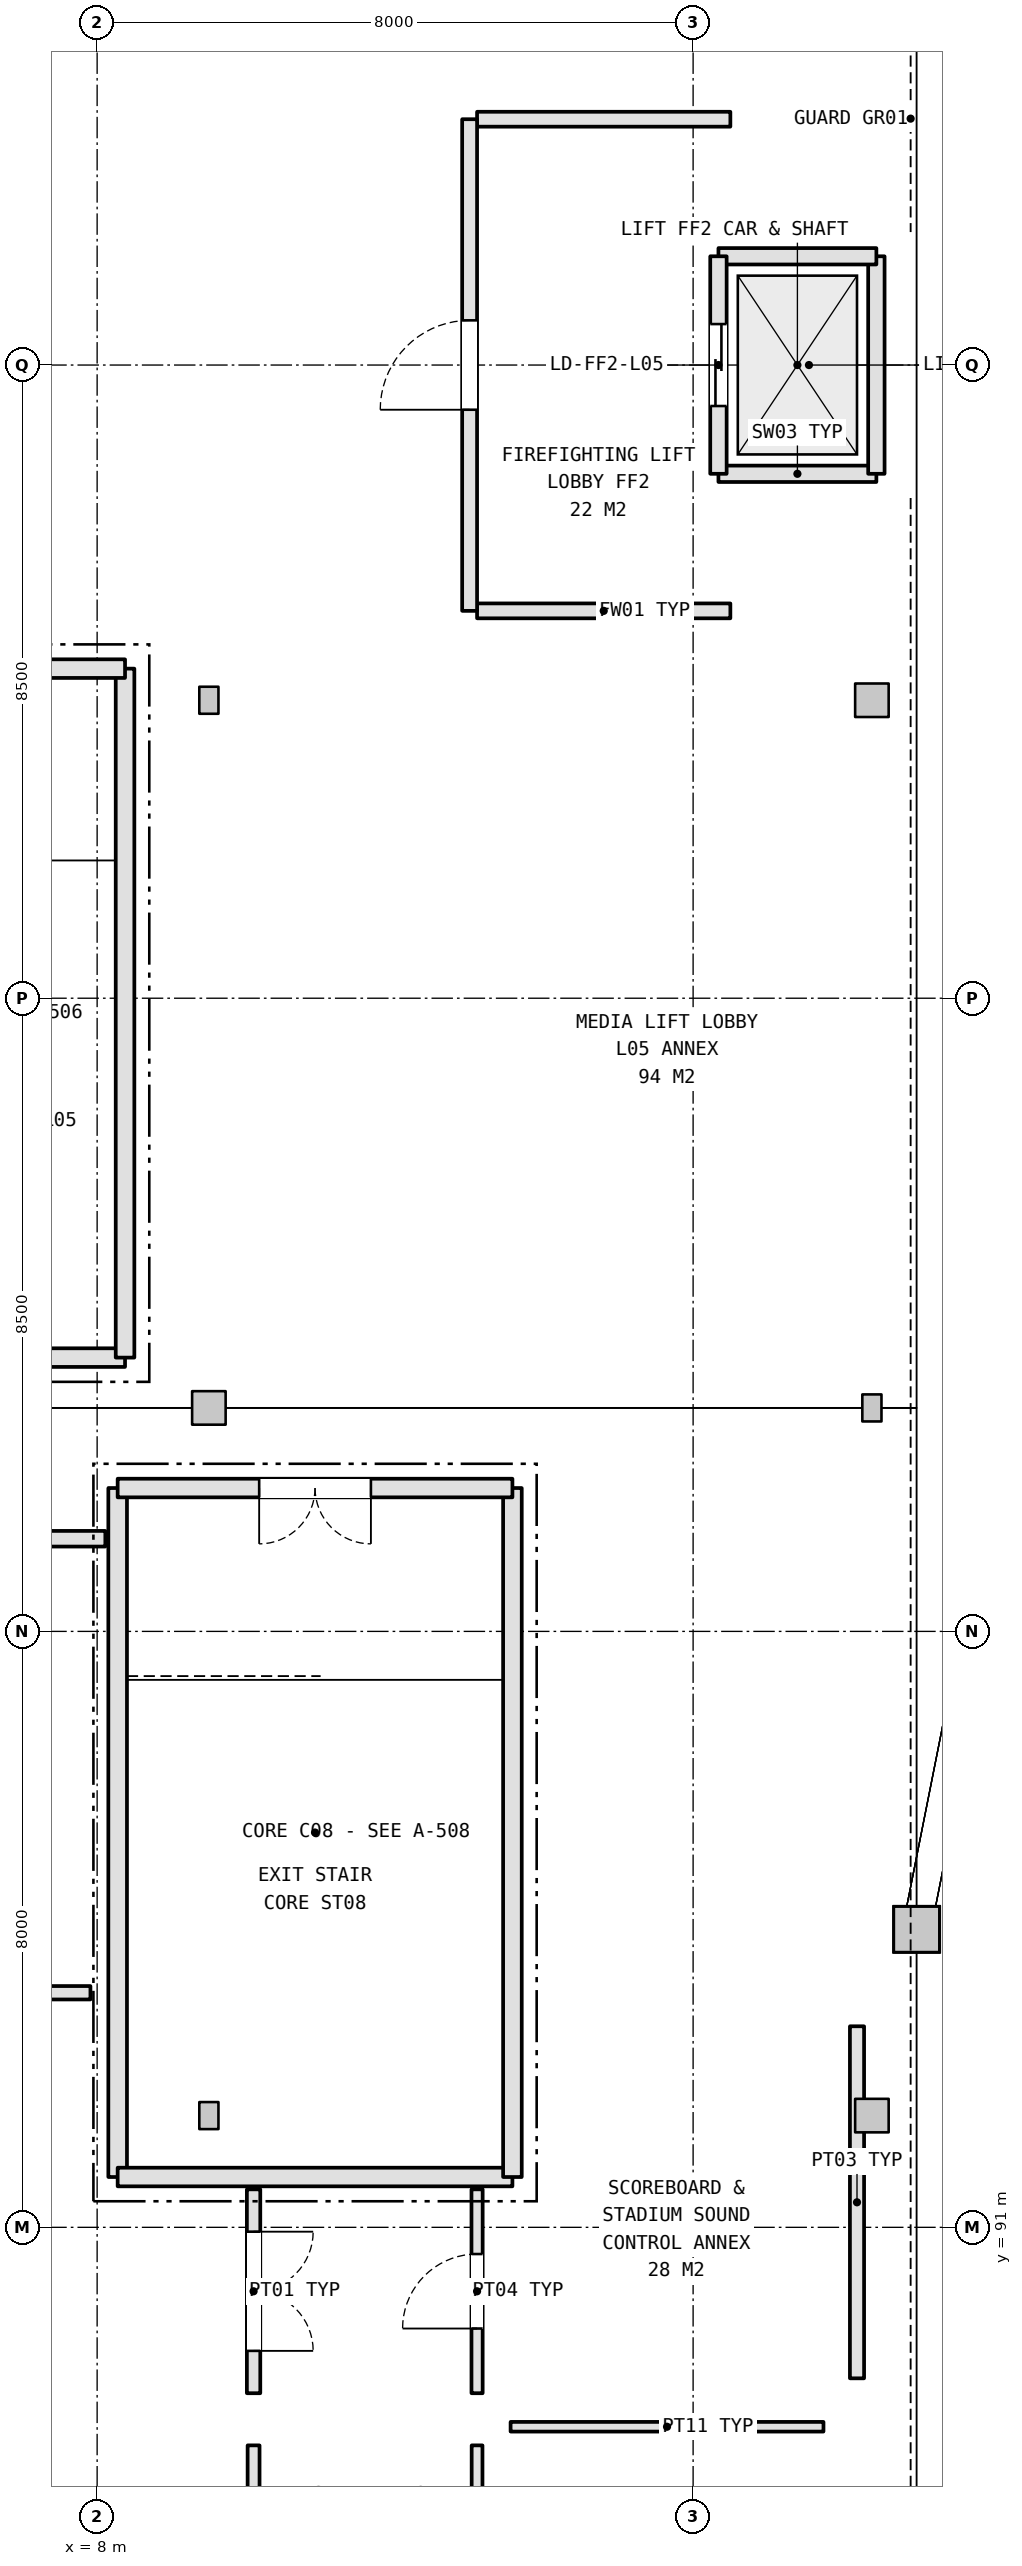
"""IFC4 building model, lengths in metres.
Left out: names, types, materials, properties, quantities, classifications, styles, units other than length and angle.
Written with IfcOpenShell. Run it as: python <this file> out.ifc"""

import sys

from ifc_helpers import new_model, si_unit, direction, frame, frame_2d, origin, origin_2d, place, context, subcontext, project, spatial, rectangle, hollow_circle, i_section, extrude, element, fill, save


model = new_model("IFC4")
c1 = context("Model", 3, precision=1e-05, world=origin(), true_north=direction((0.0, 1.0)))
c2 = subcontext(c1, "Body", "Model", "MODEL_VIEW")
j1 = project(units=[si_unit("LENGTHUNIT", "METRE"), si_unit("PLANEANGLEUNIT", "RADIAN")], contexts=[c1])
p1 = place(None, origin())
s1 = spatial("IfcSite", under=j1, at=p1, CompositionType="ELEMENT")
p2 = place(p1, origin())
s2 = spatial("IfcBuilding", under=s1, at=p2, CompositionType="ELEMENT")
p3 = place(p2, frame((0.0, 0.0, 27.0)))
s3 = spatial("IfcBuildingStorey", under=s2, at=p3, CompositionType="ELEMENT", Elevation=27.0)
p4 = place(p3, frame((19.0, 95.0, 0.0), z_axis=(0.0, 0.0, 1.0), x_axis=(1.0, 0.0, 0.0)))
e1 = element("IfcColumn", 1, at=p4, inside=s3, PredefinedType="PILASTER", context=c2, shape_type="SweptSolid", body=[
    extrude(hollow_circle(Radius=0.305, WallThickness=0.025, at=origin_2d()), origin(), (0.0, 0.0, 1.0), 4.8),
])
p5 = place(p3, frame((9.5, 92.5, 0.0), z_axis=(0.0, 0.0, 1.0), x_axis=(1.0, 0.0, 0.0)))
e2 = element("IfcColumn", 2, at=p5, inside=s3, PredefinedType="COLUMN", context=c2, shape_type="SweptSolid", body=[
    extrude(i_section(OverallWidth=0.257, OverallDepth=0.363, WebThickness=0.013, FlangeThickness=0.022, FilletRadius=0.015, at=origin_2d()), origin(), (0.0, 0.0, 1.0), 5.428),
])
p6 = place(p3, frame((9.5, 102.0, 0.0), z_axis=(0.0, 0.0, 1.0), x_axis=(1.0, 0.0, 0.0)))
e3 = element("IfcColumn", 3, at=p6, inside=s3, PredefinedType="COLUMN", context=c2, shape_type="SweptSolid", body=[
    extrude(rectangle(XDim=0.45, YDim=0.45, at=origin_2d()), origin(), (0.0, 0.0, 1.0), 5.428),
])
p7 = place(p3, frame((9.5, 111.5, 0.0), z_axis=(0.0, 0.0, 1.0), x_axis=(1.0, 0.0, 0.0)))
e4 = element("IfcColumn", 4, at=p7, inside=s3, PredefinedType="COLUMN", context=c2, shape_type="SweptSolid", body=[
    extrude(i_section(OverallWidth=0.257, OverallDepth=0.363, WebThickness=0.013, FlangeThickness=0.022, FilletRadius=0.015, at=origin_2d()), origin(), (0.0, 0.0, 1.0), 5.428),
])
p8 = place(p3, frame((18.4, 92.5, 0.0), z_axis=(0.0, 0.0, 1.0), x_axis=(1.0, 0.0, 0.0)))
e5 = element("IfcColumn", 5, at=p8, inside=s3, PredefinedType="COLUMN", context=c2, shape_type="SweptSolid", body=[
    extrude(rectangle(XDim=0.45, YDim=0.45, at=origin_2d()), origin(), (0.0, 0.0, 1.0), 6.186),
])
p9 = place(p3, frame((18.4, 102.0, 0.0), z_axis=(0.0, 0.0, 1.0), x_axis=(1.0, 0.0, 0.0)))
e6 = element("IfcColumn", 6, at=p9, inside=s3, PredefinedType="COLUMN", context=c2, shape_type="SweptSolid", body=[
    extrude(i_section(OverallWidth=0.257, OverallDepth=0.363, WebThickness=0.013, FlangeThickness=0.022, FilletRadius=0.015, at=origin_2d()), origin(), (0.0, 0.0, 1.0), 6.186),
])
p10 = place(p3, frame((18.4, 111.5, 0.0), z_axis=(0.0, 0.0, 1.0), x_axis=(1.0, 0.0, 0.0)))
e7 = element("IfcColumn", 7, at=p10, inside=s3, PredefinedType="COLUMN", context=c2, shape_type="SweptSolid", body=[
    extrude(rectangle(XDim=0.45, YDim=0.45, at=origin_2d()), origin(), (0.0, 0.0, 1.0), 6.186),
])
p11 = place(p3, frame((3.075, 102.675, 0.0), z_axis=(0.0, 0.0, 1.0), x_axis=(1.0, 0.0, 0.0)))
e8 = element("IfcWall", 8, at=p11, inside=s3, PredefinedType="SHEAR", context=c2, shape_type="SweptSolid", body=[
    extrude(rectangle(XDim=5.299, YDim=0.25, at=frame_2d((2.649, 0.0))), origin(), (0.0, 0.0, 1.0), 4.62),
])
p12 = place(p3, frame((8.375, 102.675, 0.0), z_axis=(0.0, 0.0, 1.0), x_axis=(0.0, 1.0, 0.0)))
e9 = element("IfcWall", 9, at=p12, inside=s3, PredefinedType="SHEAR", context=c2, shape_type="SweptSolid", body=[
    extrude(rectangle(XDim=9.249, YDim=0.25, at=frame_2d((4.625, 0.0))), origin(), (0.0, 0.0, 1.0), 4.62),
])
p13 = place(p3, frame((8.375, 111.925, 0.0), z_axis=(0.0, 0.0, 1.0), x_axis=(-1.0, 0.0, 0.0)))
e10 = element("IfcWall", 10, at=p13, inside=s3, PredefinedType="SHEAR", context=c2, shape_type="SweptSolid", body=[
    extrude(rectangle(XDim=5.299, YDim=0.25, at=frame_2d((2.649, 0.0))), origin(), (0.0, 0.0, 1.0), 4.62),
])
p14 = place(p13, frame((1.9, 0.0, 0.0)))
e11 = element("IfcOpeningElement", 11, at=p14, cuts=e10, PredefinedType="OPENING", context=c2, shape_type="SweptSolid", body=[
    extrude(rectangle(XDim=1.5, YDim=2.2, at=frame_2d((0.75, 1.1))), frame((0.0, 0.135, 0.0), z_axis=(0.0, -1.0, 0.0), x_axis=(1.0, 0.0, 0.0)), (0.0, 0.0, 1.0), 0.27),
])
p15 = place(p3, frame((8.275, 100.925, 0.0), z_axis=(0.0, 0.0, 1.0), x_axis=(0.0, -1.0, 0.0)))
e12 = element("IfcWall", 12, at=p15, inside=s3, PredefinedType="SHEAR", context=c2, shape_type="SweptSolid", body=[
    extrude(rectangle(XDim=9.249, YDim=0.25, at=frame_2d((4.625, 0.0))), origin(), (0.0, 0.0, 1.0), 4.62),
])
p16 = place(p3, frame((8.275, 91.675, 0.0), z_axis=(0.0, 0.0, 1.0), x_axis=(1.0, 0.0, 0.0)))
e13 = element("IfcWall", 13, at=p16, inside=s3, PredefinedType="SHEAR", context=c2, shape_type="SweptSolid", body=[
    extrude(rectangle(XDim=5.299, YDim=0.25, at=frame_2d((2.65, 0.0))), origin(), (0.0, 0.0, 1.0), 4.62),
])
p17 = place(p3, frame((13.575, 91.675, 0.0), z_axis=(0.0, 0.0, 1.0), x_axis=(0.0, 1.0, 0.0)))
e14 = element("IfcWall", 14, at=p17, inside=s3, PredefinedType="SHEAR", context=c2, shape_type="SweptSolid", body=[
    extrude(rectangle(XDim=9.249, YDim=0.25, at=frame_2d((4.625, 0.0))), origin(), (0.0, 0.0, 1.0), 4.62),
])
p18 = place(p3, frame((13.575, 100.925, 0.0), z_axis=(0.0, 0.0, 1.0), x_axis=(-1.0, 0.0, 0.0)))
e15 = element("IfcWall", 15, at=p18, inside=s3, PredefinedType="SHEAR", context=c2, shape_type="SweptSolid", body=[
    extrude(rectangle(XDim=5.299, YDim=0.25, at=frame_2d((2.65, 0.0))), origin(), (0.0, 0.0, 1.0), 4.62),
])
p19 = place(p18, frame((1.9, 0.0, 0.0)))
e16 = element("IfcOpeningElement", 16, at=p19, cuts=e15, PredefinedType="OPENING", context=c2, shape_type="SweptSolid", body=[
    extrude(rectangle(XDim=1.5, YDim=2.2, at=frame_2d((0.75, 1.1))), frame((0.0, 0.135, 0.0), z_axis=(0.0, -1.0, 0.0), x_axis=(1.0, 0.0, 0.0)), (0.0, 0.0, 1.0), 0.27),
])
p20 = place(p3, frame((16.34, 114.54, 0.0), z_axis=(0.0, 0.0, 1.0), x_axis=(1.0, 0.0, 0.0)))
e17 = element("IfcWall", 17, at=p20, inside=s3, PredefinedType="SHEAR", context=c2, shape_type="SweptSolid", body=[
    extrude(rectangle(XDim=2.12, YDim=0.22, at=frame_2d((1.06, 0.0))), origin(), (0.0, 0.0, 1.0), 4.62),
])
p21 = place(p3, frame((18.46, 114.54, 0.0), z_axis=(0.0, 0.0, 1.0), x_axis=(0.0, 1.0, 0.0)))
e18 = element("IfcWall", 18, at=p21, inside=s3, PredefinedType="SHEAR", context=c2, shape_type="SweptSolid", body=[
    extrude(rectangle(XDim=2.92, YDim=0.22, at=frame_2d((1.46, 0.0))), origin(), (0.0, 0.0, 1.0), 4.62),
])
p22 = place(p3, frame((18.46, 117.46, 0.0), z_axis=(0.0, 0.0, 1.0), x_axis=(-1.0, 0.0, 0.0)))
e19 = element("IfcWall", 19, at=p22, inside=s3, PredefinedType="SHEAR", context=c2, shape_type="SweptSolid", body=[
    extrude(rectangle(XDim=2.12, YDim=0.22, at=frame_2d((1.06, 0.0))), origin(), (0.0, 0.0, 1.0), 4.62),
])
p23 = place(p3, frame((16.34, 117.46, 0.0), z_axis=(0.0, 0.0, 1.0), x_axis=(0.0, -1.0, 0.0)))
e20 = element("IfcWall", 20, at=p23, inside=s3, PredefinedType="SHEAR", context=c2, shape_type="SweptSolid", body=[
    extrude(rectangle(XDim=2.92, YDim=0.22, at=frame_2d((1.46, 0.0))), origin(), (0.0, 0.0, 1.0), 4.62),
])
p24 = place(p23, frame((0.91, 0.0, 0.0)))
e21 = element("IfcOpeningElement", 21, at=p24, cuts=e20, PredefinedType="OPENING", context=c2, shape_type="SweptSolid", body=[
    extrude(rectangle(XDim=1.1, YDim=2.2, at=frame_2d((0.55, 1.1))), frame((0.0, 0.12, 0.0), z_axis=(0.0, -1.0, 0.0), x_axis=(1.0, 0.0, 0.0)), (0.0, 0.0, 1.0), 0.24),
])
for number, where, z_axis, x_axis in (
    (22, (13.1, 112.7, 0.0), (0.0, 0.0, 1.0), (1.0, 0.0, 0.0)),
    (23, (16.5, 119.3, 0.0), (0.0, 0.0, 1.0), (-1.0, 0.0, 0.0)),
):
    element("IfcWall", number, at=place(p3, frame(where, z_axis=z_axis, x_axis=x_axis)), inside=s3, PredefinedType="SOLIDWALL", context=c2, shape_type="SweptSolid", body=[
        extrude(rectangle(XDim=3.4, YDim=0.2, at=frame_2d((1.7, 0.0))), origin(), (0.0, 0.0, 1.0), 3.3),
    ])
p25 = place(p3, frame((13.0, 119.3, 0.0), z_axis=(0.0, 0.0, 1.0), x_axis=(0.0, -1.0, 0.0)))
e24 = element("IfcWall", 24, at=p25, inside=s3, PredefinedType="SOLIDWALL", context=c2, shape_type="SweptSolid", body=[
    extrude(rectangle(XDim=6.6, YDim=0.2, at=frame_2d((3.3, 0.0))), origin(), (0.0, 0.0, 1.0), 3.3),
])
p26 = place(p25, frame((2.7, 0.0, 0.0)))
e25 = element("IfcOpeningElement", 25, at=p26, cuts=e24, PredefinedType="OPENING", context=c2, shape_type="SweptSolid", body=[
    extrude(rectangle(XDim=1.2, YDim=2.2, at=frame_2d((0.6, 1.1))), frame((0.0, 0.11, 0.0), z_axis=(0.0, -1.0, 0.0), x_axis=(1.0, 0.0, 0.0)), (0.0, 0.0, 1.0), 0.22),
])
p27 = place(p3, frame((10.1, 88.073, 0.0), z_axis=(0.0, 0.0, 1.0), x_axis=(0.0, -1.0, 0.0)))
e26 = element("IfcWall", 26, at=p27, inside=s3, PredefinedType="PARTITIONING", context=c2, shape_type="SweptSolid", body=[
    extrude(rectangle(XDim=6.47, YDim=0.16, at=frame_2d((3.235, 0.0))), origin(), (0.0, 0.0, 1.0), 3.5),
])
p28 = place(p27, frame((2.725, 0.0, 0.0)))
e27 = element("IfcOpeningElement", 27, at=p28, cuts=e26, PredefinedType="OPENING", context=c2, shape_type="SweptSolid", body=[
    extrude(rectangle(XDim=1.02, YDim=2.15, at=frame_2d((0.51, 1.075))), frame((0.0, 0.09, 0.0), z_axis=(0.0, -1.0, 0.0), x_axis=(1.0, 0.0, 0.0)), (0.0, 0.0, 1.0), 0.18),
])
p29 = place(p3, frame((13.1, 81.603, 0.0), z_axis=(0.0, 0.0, 1.0), x_axis=(0.0, 1.0, 0.0)))
e28 = element("IfcWall", 28, at=p29, inside=s3, PredefinedType="PARTITIONING", context=c2, shape_type="SweptSolid", body=[
    extrude(rectangle(XDim=6.47, YDim=0.145, at=frame_2d((3.235, 0.0))), origin(), (0.0, 0.0, 1.0), 3.5),
])
p30 = place(p29, frame((2.675, 0.0, 0.0)))
e29 = element("IfcOpeningElement", 29, at=p30, cuts=e28, PredefinedType="OPENING", context=c2, shape_type="SweptSolid", body=[
    extrude(rectangle(XDim=1.12, YDim=2.2, at=frame_2d((0.56, 1.1))), frame((0.0, 0.083, 0.0), z_axis=(0.0, -1.0, 0.0), x_axis=(1.0, 0.0, 0.0)), (0.0, 0.0, 1.0), 0.165),
])
p31 = place(p3, frame((13.55, 88.323, 0.0), z_axis=(0.0, 0.0, 1.0), x_axis=(1.0, 0.0, 0.0)))
e30 = element("IfcWall", 30, at=p31, inside=s3, PredefinedType="PARTITIONING", context=c2, shape_type="SweptSolid", body=[
    extrude(rectangle(XDim=4.2, YDim=0.13, at=frame_2d((2.1, 0.0))), origin(), (0.0, 0.0, 1.0), 3.5),
])
p32 = place(p3, frame((10.1, 91.51, 0.0), z_axis=(0.0, 0.0, 1.0), x_axis=(0.0, -1.0, 0.0)))
e31 = element("IfcWall", 31, at=p32, inside=s3, PredefinedType="PARTITIONING", context=c2, shape_type="SweptSolid", body=[
    extrude(rectangle(XDim=2.737, YDim=0.18, at=frame_2d((1.369, 0.0))), origin(), (0.0, 0.0, 1.0), 3.5),
])
p33 = place(p32, frame((0.569, 0.0, 0.0)))
e32 = element("IfcOpeningElement", 32, at=p33, cuts=e31, PredefinedType="OPENING", context=c2, shape_type="SweptSolid", body=[
    extrude(rectangle(XDim=1.6, YDim=2.2, at=frame_2d((0.8, 1.1))), frame((0.0, 0.1, 0.0), z_axis=(0.0, -1.0, 0.0), x_axis=(1.0, 0.0, 0.0)), (0.0, 0.0, 1.0), 0.2),
])
p34 = place(p3, frame((1.25, 94.149, 0.0), z_axis=(0.0, 0.0, 1.0), x_axis=(1.0, 0.0, 0.0)))
e33 = element("IfcWall", 33, at=p34, inside=s3, PredefinedType="PARTITIONING", context=c2, shape_type="SweptSolid", body=[
    extrude(rectangle(XDim=6.66, YDim=0.18, at=frame_2d((3.33, 0.0))), origin(), (0.0, 0.0, 1.0), 3.5),
])
p35 = place(p3, frame((13.1, 88.773, 0.0), z_axis=(0.0, 0.0, 1.0), x_axis=(0.0, 1.0, 0.0)))
e34 = element("IfcWall", 34, at=p35, inside=s3, PredefinedType="PARTITIONING", context=c2, shape_type="SweptSolid", body=[
    extrude(rectangle(XDim=2.737, YDim=0.15, at=frame_2d((1.369, 0.0))), origin(), (0.0, 0.0, 1.0), 3.5),
])
p36 = place(p35, frame((0.868, 0.0, 0.0)))
e35 = element("IfcOpeningElement", 35, at=p36, cuts=e34, PredefinedType="OPENING", context=c2, shape_type="SweptSolid", body=[
    extrude(rectangle(XDim=1.0, YDim=2.1, at=frame_2d((0.5, 1.05))), frame((0.0, 0.085, 0.0), z_axis=(0.0, -1.0, 0.0), x_axis=(1.0, 0.0, 0.0)), (0.0, 0.0, 1.0), 0.17),
])
p37 = place(p3, frame((18.2, 93.699, 0.0), z_axis=(0.0, 0.0, 1.0), x_axis=(0.0, -1.0, 0.0)))
e36 = element("IfcWall", 36, at=p37, inside=s3, PredefinedType="PARTITIONING", context=c2, shape_type="SweptSolid", body=[
    extrude(rectangle(XDim=4.726, YDim=0.19, at=frame_2d((2.363, 0.0))), origin(), (0.0, 0.0, 1.0), 3.5),
])
p38 = place(p3, frame((1.05, 100.244, 0.0), z_axis=(0.0, 0.0, 1.0), x_axis=(1.0, 0.0, 0.0)))
e37 = element("IfcWall", 37, at=p38, inside=s3, PredefinedType="PLUMBINGWALL", context=c2, shape_type="SweptSolid", body=[
    extrude(rectangle(XDim=7.06, YDim=0.21, at=frame_2d((3.53, 0.0))), origin(), (0.0, 0.0, 1.0), 3.5),
])
p39 = place(p38, frame((3.005, 0.0, 0.0)))
e38 = element("IfcOpeningElement", 38, at=p39, cuts=e37, PredefinedType="OPENING", context=c2, shape_type="SweptSolid", body=[
    extrude(rectangle(XDim=1.05, YDim=2.2, at=frame_2d((0.525, 1.1))), frame((0.0, 0.115, 0.0), z_axis=(0.0, -1.0, 0.0), x_axis=(1.0, 0.0, 0.0)), (0.0, 0.0, 1.0), 0.23),
])
p40 = place(p19, origin())
e39 = element("IfcDoor", 39, at=p40, inside=s3, OperationType="DOUBLE_DOOR_SINGLE_SWING", PredefinedType="DOOR", context=c2, shape_type="SweptSolid", body=[
    extrude(rectangle(XDim=1.5, YDim=2.2, at=frame_2d((0.75, 1.1))), frame((0.0, 0.025, 0.0), z_axis=(0.0, -1.0, 0.0), x_axis=(1.0, 0.0, 0.0)), (0.0, 0.0, 1.0), 0.05),
])
fill(e16, e39)
p41 = place(p24, origin())
e40 = element("IfcDoor", 40, at=p41, inside=s3, OperationType="DOUBLE_DOOR_SLIDING", PredefinedType="DOOR", context=c2, shape_type="SweptSolid", body=[
    extrude(rectangle(XDim=1.1, YDim=2.2, at=frame_2d((0.55, 1.1))), frame((0.0, 0.025, 0.0), z_axis=(0.0, -1.0, 0.0), x_axis=(1.0, 0.0, 0.0)), (0.0, 0.0, 1.0), 0.05),
])
fill(e21, e40)
p42 = place(p26, frame((1.2, 0.0, 0.0), z_axis=(0.0, 0.0, 1.0), x_axis=(-1.0, 0.0, 0.0)))
e41 = element("IfcDoor", 41, at=p42, inside=s3, OperationType="SINGLE_SWING_RIGHT", PredefinedType="DOOR", context=c2, shape_type="SweptSolid", body=[
    extrude(rectangle(XDim=1.2, YDim=2.2, at=frame_2d((0.6, 1.1))), frame((0.0, 0.025, 0.0), z_axis=(0.0, -1.0, 0.0), x_axis=(1.0, 0.0, 0.0)), (0.0, 0.0, 1.0), 0.05),
])
fill(e25, e41)
p43 = place(p33, origin())
e42 = element("IfcDoor", 42, at=p43, inside=s3, OperationType="DOUBLE_DOOR_SINGLE_SWING", PredefinedType="DOOR", context=c2, shape_type="SweptSolid", body=[
    extrude(rectangle(XDim=1.6, YDim=2.2, at=frame_2d((0.8, 1.1))), frame((0.0, 0.025, 0.0), z_axis=(0.0, -1.0, 0.0), x_axis=(1.0, 0.0, 0.0)), (0.0, 0.0, 1.0), 0.05),
])
fill(e32, e42)
p44 = place(p36, origin())
e43 = element("IfcDoor", 43, at=p44, inside=s3, OperationType="SINGLE_SWING_LEFT", PredefinedType="DOOR", context=c2, shape_type="SweptSolid", body=[
    extrude(rectangle(XDim=1.0, YDim=2.1, at=frame_2d((0.5, 1.05))), frame((0.0, 0.025, 0.0), z_axis=(0.0, -1.0, 0.0), x_axis=(1.0, 0.0, 0.0)), (0.0, 0.0, 1.0), 0.05),
])
fill(e35, e43)
save(model, sys.argv[1])
